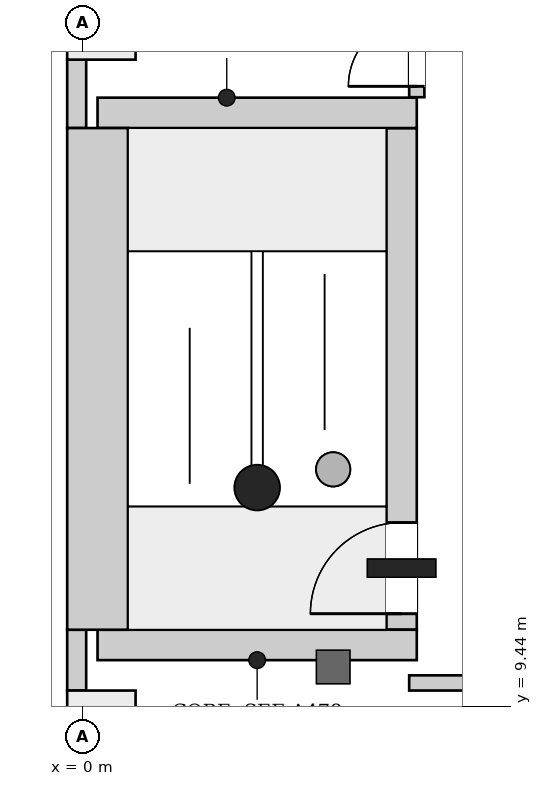
"""IFC4 building model, lengths in metres.
Left out: names, types, materials, properties, quantities, classifications, styles, units other than length and angle.
Written with IfcOpenShell. Run it as: python <this file> out.ifc"""

import sys

from ifc_helpers import new_model, si_unit, direction, frame, frame_2d, origin, origin_2d, place, context, subcontext, project, spatial, rectangle, extrude, element, fill, save


model = new_model("IFC4")
c1 = context("Model", 3, precision=1e-05, world=origin(), true_north=direction((0.0, 1.0)))
c2 = subcontext(c1, "Body", "Model", "MODEL_VIEW")
j1 = project(units=[si_unit("LENGTHUNIT", "METRE"), si_unit("PLANEANGLEUNIT", "RADIAN")], contexts=[c1])
p1 = place(None, origin())
s1 = spatial("IfcSite", under=j1, at=p1, CompositionType="ELEMENT")
p2 = place(p1, origin())
s2 = spatial("IfcBuilding", under=s1, at=p2, CompositionType="ELEMENT")
p3 = place(p2, frame((0.0, 0.0, 57.1)))
s3 = spatial("IfcBuildingStorey", under=s2, at=p3, CompositionType="ELEMENT", Elevation=57.1)
for number, where, z_axis, x_axis in (
    (1, (0.2, 10.25, 0.0), (0.0, 0.0, 1.0), (1.0, 0.0, 0.0)),
    (2, (0.2, 17.25, 0.0), (0.0, 0.0, 1.0), (1.0, 0.0, 0.0)),
):
    element("IfcWall", number, at=place(p3, frame(where, z_axis=z_axis, x_axis=x_axis)), inside=s3, PredefinedType="SHEAR", context=c2, shape_type="SweptSolid", body=[
        extrude(rectangle(XDim=4.2, YDim=0.4, at=frame_2d((2.1, 0.0))), origin(), (0.0, 0.0, 1.0), 4.2),
    ])
p4 = place(p3, frame((0.2, 10.45, 0.0), z_axis=(0.0, 0.0, 1.0), x_axis=(0.0, 1.0, 0.0)))
e3 = element("IfcWall", 3, at=p4, inside=s3, PredefinedType="SHEAR", context=c2, shape_type="SweptSolid", body=[
    extrude(rectangle(XDim=6.6, YDim=0.8, at=frame_2d((3.3, 0.0))), origin(), (0.0, 0.0, 1.0), 4.2),
])
p5 = place(p3, frame((4.2, 10.45, 0.0), z_axis=(0.0, 0.0, 1.0), x_axis=(0.0, 1.0, 0.0)))
e4 = element("IfcWall", 4, at=p5, inside=s3, PredefinedType="SHEAR", context=c2, shape_type="SweptSolid", body=[
    extrude(rectangle(XDim=6.6, YDim=0.4, at=frame_2d((3.3, 0.0))), origin(), (0.0, 0.0, 1.0), 4.2),
])
p6 = place(p5, frame((0.21, 0.0, 0.0)))
e5 = element("IfcOpeningElement", 5, at=p6, cuts=e4, PredefinedType="OPENING", context=c2, shape_type="SweptSolid", body=[
    extrude(rectangle(XDim=1.2, YDim=2.1, at=frame_2d((0.6, 1.05))), frame((0.0, 0.21, 0.0), z_axis=(0.0, -1.0, 0.0), x_axis=(1.0, 0.0, 0.0)), (0.0, 0.0, 1.0), 0.42),
])
for number, where, z_axis, x_axis in (
    (6, (0.25, 9.2, 0.0), (0.0, 0.0, 1.0), (1.0, 0.0, 0.0)),
    (7, (0.25, 18.4, 0.0), (0.0, 0.0, 1.0), (1.0, 0.0, 0.0)),
):
    element("IfcColumn", number, at=place(p3, frame(where, z_axis=z_axis, x_axis=x_axis)), inside=s3, PredefinedType="COLUMN", context=c2, shape_type="SweptSolid", body=[
        extrude(rectangle(XDim=0.9, YDim=0.9, at=origin_2d()), origin(), (0.0, 0.0, 1.0), 4.2),
    ])
p7 = place(p3, frame((-0.074, 10.45, 0.0), z_axis=(0.0, 0.0, 1.0), x_axis=(0.0, -1.0, 0.0)))
e8 = element("IfcWall", 8, at=p7, inside=s3, PredefinedType="ELEMENTEDWALL", context=c2, shape_type="SweptSolid", body=[
    extrude(rectangle(XDim=0.8, YDim=0.25, at=frame_2d((0.4, 0.0))), origin(), (0.0, 0.0, 1.0), 3.9),
])
p8 = place(p3, frame((-0.074, 17.95, 0.0), z_axis=(0.0, 0.0, 1.0), x_axis=(0.0, -1.0, 0.0)))
e9 = element("IfcWall", 9, at=p8, inside=s3, PredefinedType="ELEMENTEDWALL", context=c2, shape_type="SweptSolid", body=[
    extrude(rectangle(XDim=0.9, YDim=0.25, at=frame_2d((0.45, 0.0))), origin(), (0.0, 0.0, 1.0), 3.9),
])
p9 = place(p3, frame((4.3, 9.75, 0.0), z_axis=(0.0, 0.0, 1.0), x_axis=(1.0, 0.0, 0.0)))
e10 = element("IfcWall", 10, at=p9, inside=s3, PredefinedType="PARTITIONING", context=c2, shape_type="SweptSolid", body=[
    extrude(rectangle(XDim=43.894, YDim=0.2, at=frame_2d((21.947, 0.0))), origin(), (0.0, 0.0, 1.0), 3.9),
])
p10 = place(p9, frame((6.6, 0.0, 0.0)))
e11 = element("IfcOpeningElement", 11, at=p10, cuts=e10, PredefinedType="OPENING", context=c2, shape_type="SweptSolid", body=[
    extrude(rectangle(XDim=1.8, YDim=2.1, at=frame_2d((0.9, 1.05))), frame((0.0, 0.11, 0.0), z_axis=(0.0, -1.0, 0.0), x_axis=(1.0, 0.0, 0.0)), (0.0, 0.0, 1.0), 0.22),
])
p11 = place(p9, frame((22.25, 0.0, 0.0)))
e12 = element("IfcOpeningElement", 12, at=p11, cuts=e10, PredefinedType="OPENING", context=c2, shape_type="SweptSolid", body=[
    extrude(rectangle(XDim=1.8, YDim=2.1, at=frame_2d((0.9, 1.05))), frame((0.0, 0.11, 0.0), z_axis=(0.0, -1.0, 0.0), x_axis=(1.0, 0.0, 0.0)), (0.0, 0.0, 1.0), 0.22),
])
p12 = place(p9, frame((38.4, 0.0, 0.0)))
e13 = element("IfcOpeningElement", 13, at=p12, cuts=e10, PredefinedType="OPENING", context=c2, shape_type="SweptSolid", body=[
    extrude(rectangle(XDim=1.2, YDim=2.1, at=frame_2d((0.6, 1.05))), frame((0.0, 0.11, 0.0), z_axis=(0.0, -1.0, 0.0), x_axis=(1.0, 0.0, 0.0)), (0.0, 0.0, 1.0), 0.22),
])
p13 = place(p3, frame((4.4, 17.456, 0.0), z_axis=(0.0, 0.0, 1.0), x_axis=(0.0, 1.0, 0.0)))
e14 = element("IfcWall", 14, at=p13, inside=s3, PredefinedType="PARTITIONING", context=c2, shape_type="SweptSolid", body=[
    extrude(rectangle(XDim=1.188, YDim=0.2, at=frame_2d((0.594, 0.0))), origin(), (0.0, 0.0, 1.0), 3.9),
])
p14 = place(p13, frame((0.144, 0.0, 0.0)))
e15 = element("IfcOpeningElement", 15, at=p14, cuts=e14, PredefinedType="OPENING", context=c2, shape_type="SweptSolid", body=[
    extrude(rectangle(XDim=0.9, YDim=2.1, at=frame_2d((0.45, 1.05))), frame((0.0, 0.11, 0.0), z_axis=(0.0, -1.0, 0.0), x_axis=(1.0, 0.0, 0.0)), (0.0, 0.0, 1.0), 0.22),
])
p15 = place(p6, origin())
e16 = element("IfcDoor", 16, at=p15, inside=s3, OperationType="SINGLE_SWING_RIGHT", PredefinedType="DOOR", context=c2, shape_type="SweptSolid", body=[
    extrude(rectangle(XDim=1.2, YDim=2.1, at=frame_2d((0.6, 1.05))), frame((0.0, 0.025, 0.0), z_axis=(0.0, -1.0, 0.0), x_axis=(1.0, 0.0, 0.0)), (0.0, 0.0, 1.0), 0.05),
])
fill(e5, e16)
p16 = place(p14, origin())
e17 = element("IfcDoor", 17, at=p16, inside=s3, OperationType="SINGLE_SWING_LEFT", PredefinedType="DOOR", context=c2, shape_type="SweptSolid", body=[
    extrude(rectangle(XDim=0.9, YDim=2.1, at=frame_2d((0.45, 1.05))), frame((0.0, 0.025, 0.0), z_axis=(0.0, -1.0, 0.0), x_axis=(1.0, 0.0, 0.0)), (0.0, 0.0, 1.0), 0.05),
])
fill(e15, e17)
save(model, sys.argv[1])
